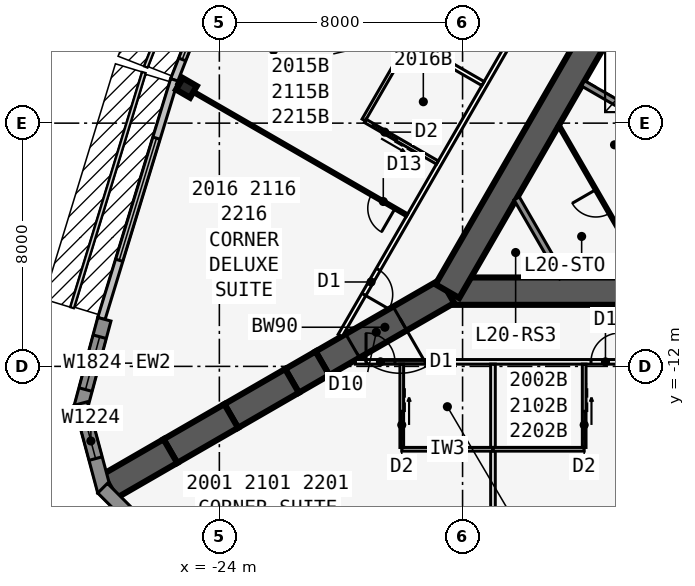
"""IFC4 building model, lengths in metres.
Left out: names, types, materials, properties, quantities, classifications, styles, units other than length and angle.
Written with IfcOpenShell. Run it as: python <this file> out.ifc"""

import sys

from ifc_helpers import new_model, si_unit, direction, frame, frame_2d, origin, origin_2d, place, context, subcontext, project, spatial, polyline, rectangle, i_section, outline, extrude, element, fill, save


model = new_model("IFC4")
c1 = context("Model", 3, precision=1e-05, world=origin(), true_north=direction((0.0, 1.0)))
c2 = subcontext(c1, "Body", "Model", "MODEL_VIEW")
j1 = project(units=[si_unit("LENGTHUNIT", "METRE"), si_unit("PLANEANGLEUNIT", "RADIAN")], contexts=[c1])
p1 = place(None, origin())
s1 = spatial("IfcSite", under=j1, at=p1, CompositionType="ELEMENT")
p2 = place(p1, origin())
s2 = spatial("IfcBuilding", under=s1, at=p2, CompositionType="ELEMENT")
p3 = place(p2, frame((0.0, 0.0, 79.5)))
s3 = spatial("IfcBuildingStorey", under=s2, at=p3, CompositionType="ELEMENT", Elevation=79.5)
p4 = place(p3, frame((-16.5, -9.526, 0.0), z_axis=(0.0, 0.0, 1.0), x_axis=(1.0, 0.0, 0.0)))
e1 = element("IfcWall", 1, at=p4, inside=s3, PredefinedType="SHEAR", context=c2, shape_type="SweptSolid", body=[
    extrude(rectangle(XDim=33.0, YDim=0.9, at=frame_2d((16.5, 0.0))), origin(), (0.0, 0.0, 1.0), 3.4),
])
p5 = place(p4, frame((14.05, 0.0, 0.0)))
e2 = element("IfcOpeningElement", 2, at=p5, cuts=e1, PredefinedType="OPENING", context=c2, shape_type="SweptSolid", body=[
    extrude(rectangle(XDim=1.8, YDim=2.13, at=frame_2d((0.9, 1.065))), frame((0.0, 0.46, 0.0), z_axis=(0.0, -1.0, 0.0), x_axis=(1.0, 0.0, 0.0)), (0.0, 0.0, 1.0), 0.92),
])
p6 = place(p3, frame((0.0, 19.052, 0.0), z_axis=(0.0, 0.0, 1.0), x_axis=(-0.499999749417, -0.866025548458, 0.0)))
e3 = element("IfcWall", 3, at=p6, inside=s3, PredefinedType="SHEAR", context=c2, shape_type="SweptSolid", body=[
    extrude(rectangle(XDim=33.0, YDim=0.9, at=frame_2d((16.5, 0.0))), origin(), (0.0, 0.0, 1.0), 3.4),
])
p7 = place(p6, frame((14.15, 0.0, 0.0)))
e4 = element("IfcOpeningElement", 4, at=p7, cuts=e3, PredefinedType="OPENING", context=c2, shape_type="SweptSolid", body=[
    extrude(rectangle(XDim=1.8, YDim=2.13, at=frame_2d((0.9, 1.065))), frame((0.0, 0.46, 0.0), z_axis=(0.0, -1.0, 0.0), x_axis=(1.0, 0.0, 0.0)), (0.0, 0.0, 1.0), 0.92),
])
p8 = place(p6, frame((12.6, 0.0, 0.0)))
e5 = element("IfcOpeningElement", 5, at=p8, cuts=e3, PredefinedType="OPENING", context=c2, shape_type="SweptSolid", body=[
    extrude(rectangle(XDim=1.0, YDim=2.13, at=frame_2d((0.5, 1.065))), frame((0.0, 0.46, 0.0), z_axis=(0.0, -1.0, 0.0), x_axis=(1.0, 0.0, 0.0)), (0.0, 0.0, 1.0), 0.92),
])
p9 = place(p3, frame((-9.329, -4.256, 0.0), z_axis=(0.0, 0.0, 1.0), x_axis=(-0.866022959057, 0.500004234368, 0.0)))
e6 = element("IfcWall", 6, at=p9, inside=s3, PredefinedType="SOLIDWALL", context=c2, shape_type="SweptSolid", body=[
    extrude(rectangle(XDim=3.125, YDim=0.2, at=frame_2d((1.562, 0.0))), origin(), (0.0, 0.0, 1.0), 3.235),
])
p10 = place(p3, frame((-16.5, -9.526, 0.0), z_axis=(0.0, 0.0, 1.0), x_axis=(-0.866031398331, -0.499989616998, 0.0)))
e7 = element("IfcWall", 7, at=p10, inside=s3, PredefinedType="SHEAR", context=c2, shape_type="SweptSolid", body=[
    extrude(rectangle(XDim=4.746, YDim=0.9, at=frame_2d((2.373, 0.0))), origin(), (0.0, 0.0, 1.0), 3.4),
])
p11 = place(p10, frame((1.8, 0.0, 0.0)))
e8 = element("IfcOpeningElement", 8, at=p11, cuts=e7, PredefinedType="OPENING", context=c2, shape_type="SweptSolid", body=[
    extrude(rectangle(XDim=1.8, YDim=2.13, at=frame_2d((0.9, 1.065))), frame((0.0, 0.46, 0.0), z_axis=(0.0, -1.0, 0.0), x_axis=(1.0, 0.0, 0.0)), (0.0, 0.0, 1.0), 0.92),
])
p12 = place(p3, frame((-20.61, -11.899, 0.0), z_axis=(0.0, 0.0, 1.0), x_axis=(-0.866009537788, -0.500027479704, 0.0)))
e9 = element("IfcWall", 9, at=p12, inside=s3, PredefinedType="SHEAR", context=c2, shape_type="SweptSolid", body=[
    extrude(rectangle(XDim=1.155, YDim=0.9, at=frame_2d((0.577, 0.0))), origin(), (0.0, 0.0, 1.0), 3.4),
])
for number, where, z_axis, x_axis in (
    (10, (-21.61, -12.477, 0.0), (0.0, 0.0, 1.0), (-0.866, -0.5, 0.0)),
    (11, (-23.61, -13.631, 0.0), (0.0, 0.0, 1.0), (-0.866, -0.5, 0.0)),
    (12, (-25.61, -14.786, 0.0), (0.0, 0.0, 1.0), (-0.866, -0.5, 0.0)),
):
    element("IfcWall", number, at=place(p3, frame(where, z_axis=z_axis, x_axis=x_axis)), inside=s3, PredefinedType="SHEAR", context=c2, shape_type="SweptSolid", body=[
        extrude(rectangle(XDim=2.309, YDim=0.9, at=frame_2d((1.155, 0.0))), origin(), (0.0, 0.0, 1.0), 3.4),
    ])
p13 = place(p3, frame((-25.083, -2.839, 0.0), z_axis=(0.0, 0.0, 1.0), x_axis=(-0.5, -0.866025403784, 0.0)))
e13 = element("IfcColumn", 13, at=p13, inside=s3, PredefinedType="COLUMN", context=c2, shape_type="SweptSolid", body=[
    extrude(i_section(OverallWidth=0.442, OverallDepth=0.531, WebThickness=0.066, FlangeThickness=0.106, at=origin_2d()), origin(), (0.0, 0.0, 1.0), 3.4),
])
p14 = place(p3, frame((-23.645, 2.126, 0.0), z_axis=(0.0, 0.0, 1.0), x_axis=(-0.364013463868, -0.931393685894, 0.0)))
e14 = element("IfcWall", 14, at=p14, inside=s3, PredefinedType="STANDARD", context=c2, shape_type="SweptSolid", body=[
    extrude(rectangle(XDim=5.058, YDim=0.25, at=frame_2d((2.529, 0.0))), origin(), (0.0, 0.0, 1.0), 3.235),
])
p15 = place(p14, frame((0.729, 0.0, 0.45)))
e15 = element("IfcOpeningElement", 15, at=p15, cuts=e14, PredefinedType="OPENING", context=c2, shape_type="SweptSolid", body=[
    extrude(rectangle(XDim=3.6, YDim=2.4, at=frame_2d((1.8, 1.2))), frame((0.0, 0.135, 0.0), z_axis=(0.0, -1.0, 0.0), x_axis=(1.0, 0.0, 0.0)), (0.0, 0.0, 1.0), 0.27),
])
p16 = place(p3, frame((-25.483, -2.575, 0.0), z_axis=(0.0, 0.0, 1.0), x_axis=(-0.2919790669, -0.956424709265, 0.0)))
e16 = element("IfcWall", 16, at=p16, inside=s3, PredefinedType="STANDARD", context=c2, shape_type="SweptSolid", body=[
    extrude(rectangle(XDim=8.211, YDim=0.25, at=frame_2d((4.105, 0.0))), origin(), (0.0, 0.0, 1.0), 3.235),
])
p17 = place(p16, frame((2.006, 0.0, 0.45)))
e17 = element("IfcOpeningElement", 17, at=p17, cuts=e16, PredefinedType="OPENING", context=c2, shape_type="SweptSolid", body=[
    extrude(rectangle(XDim=4.2, YDim=2.4, at=frame_2d((2.1, 1.2))), frame((0.0, 0.135, 0.0), z_axis=(0.0, -1.0, 0.0), x_axis=(1.0, 0.0, 0.0)), (0.0, 0.0, 1.0), 0.27),
])
p18 = place(p3, frame((-27.783, -10.45, 0.0), z_axis=(0.0, 0.0, 1.0), x_axis=(-0.258780998834, -0.965936019953, 0.0)))
e18 = element("IfcWall", 18, at=p18, inside=s3, PredefinedType="SOLIDWALL", context=c2, shape_type="SweptSolid", body=[
    extrude(rectangle(XDim=2.989, YDim=0.45, at=frame_2d((1.494, 0.0))), origin(), (0.0, 0.0, 1.0), 3.235),
])
p19 = place(p18, frame((0.594, 0.0, 0.45)))
e19 = element("IfcOpeningElement", 19, at=p19, cuts=e18, PredefinedType="OPENING", context=c2, shape_type="SweptSolid", body=[
    extrude(rectangle(XDim=1.8, YDim=2.4, at=frame_2d((0.9, 1.2))), frame((0.0, 0.235, 0.0), z_axis=(0.0, -1.0, 0.0), x_axis=(1.0, 0.0, 0.0)), (0.0, 0.0, 1.0), 0.47),
])
p20 = place(p3, frame((-28.556, -13.221, 0.0), z_axis=(0.0, 0.0, 1.0), x_axis=(0.258801419081, -0.965930548995, 0.0)))
e20 = element("IfcWall", 20, at=p20, inside=s3, PredefinedType="SOLIDWALL", context=c2, shape_type="SweptSolid", body=[
    extrude(outline(polyline([(2.989, 0.225), (2.929, 0.225), (2.437, 0.093), (2.402, 0.225), (0.0, 0.225), (0.0, -0.225), (2.989, -0.225), (2.989, 0.225)])), origin(), (0.0, 0.0, 1.0), 3.235),
])
p21 = place(p20, frame((0.676, 0.0, 0.45)))
e21 = element("IfcOpeningElement", 21, at=p21, cuts=e20, PredefinedType="OPENING", context=c2, shape_type="SweptSolid", body=[
    extrude(rectangle(XDim=1.2, YDim=2.4, at=frame_2d((0.6, 1.2))), frame((0.0, 0.235, 0.0), z_axis=(0.0, -1.0, 0.0), x_axis=(1.0, 0.0, 0.0)), (0.0, 0.0, 1.0), 0.47),
])
p22 = place(p3, frame((-27.841, -16.007, 0.0), z_axis=(0.0, 0.0, 1.0), x_axis=(0.707025086683, -0.707188466253, 0.0)))
e22 = element("IfcWall", 22, at=p22, inside=s3, PredefinedType="SOLIDWALL", context=c2, shape_type="SweptSolid", body=[
    extrude(outline(polyline([(2.989, 0.225), (0.586, 0.225), (0.551, 0.093), (0.059, 0.225), (0.0, 0.225), (0.0, -0.225), (2.989, -0.225), (2.989, 0.225)])), origin(), (0.0, 0.0, 1.0), 3.235),
])
p23 = place(p22, frame((1.113, 0.0, 0.45)))
e23 = element("IfcOpeningElement", 23, at=p23, cuts=e22, PredefinedType="OPENING", context=c2, shape_type="SweptSolid", body=[
    extrude(rectangle(XDim=1.2, YDim=2.4, at=frame_2d((0.6, 1.2))), frame((0.0, 0.235, 0.0), z_axis=(0.0, -1.0, 0.0), x_axis=(1.0, 0.0, 0.0)), (0.0, 0.0, 1.0), 0.47),
])
p24 = place(p3, frame((-19.527, -11.851, 0.0), z_axis=(0.0, 0.0, 1.0), x_axis=(1.0, 0.0, 0.0)))
e24 = element("IfcWall", 24, at=p24, inside=s3, PredefinedType="PARTITIONING", context=c2, shape_type="SweptSolid", body=[
    extrude(rectangle(XDim=39.054, YDim=0.15, at=frame_2d((19.527, 0.0))), origin(), (0.0, 0.0, 1.0), 3.235),
])
p25 = place(p24, frame((0.352, 0.0, 0.0)))
e25 = element("IfcOpeningElement", 25, at=p25, cuts=e24, PredefinedType="OPENING", context=c2, shape_type="SweptSolid", body=[
    extrude(rectangle(XDim=0.95, YDim=2.13, at=frame_2d((0.475, 1.065))), frame((0.0, 0.085, 0.0), z_axis=(0.0, -1.0, 0.0), x_axis=(1.0, 0.0, 0.0)), (0.0, 0.0, 1.0), 0.17),
])
p26 = place(p24, frame((7.752, 0.0, 0.0)))
e26 = element("IfcOpeningElement", 26, at=p26, cuts=e24, PredefinedType="OPENING", context=c2, shape_type="SweptSolid", body=[
    extrude(rectangle(XDim=0.95, YDim=2.13, at=frame_2d((0.475, 1.065))), frame((0.0, 0.085, 0.0), z_axis=(0.0, -1.0, 0.0), x_axis=(1.0, 0.0, 0.0)), (0.0, 0.0, 1.0), 0.17),
])
p27 = place(p24, frame((17.752, 0.0, 0.0)))
e27 = element("IfcOpeningElement", 27, at=p27, cuts=e24, PredefinedType="OPENING", context=c2, shape_type="SweptSolid", body=[
    extrude(rectangle(XDim=0.95, YDim=2.13, at=frame_2d((0.475, 1.065))), frame((0.0, 0.085, 0.0), z_axis=(0.0, -1.0, 0.0), x_axis=(1.0, 0.0, 0.0)), (0.0, 0.0, 1.0), 0.17),
])
p28 = place(p24, frame((21.527, 0.0, 0.0)))
e28 = element("IfcOpeningElement", 28, at=p28, cuts=e24, PredefinedType="OPENING", context=c2, shape_type="SweptSolid", body=[
    extrude(rectangle(XDim=1.0, YDim=2.13, at=frame_2d((0.5, 1.065))), frame((0.0, 0.085, 0.0), z_axis=(0.0, -1.0, 0.0), x_axis=(1.0, 0.0, 0.0)), (0.0, 0.0, 1.0), 0.17),
])
p29 = place(p24, frame((27.152, 0.0, 0.0)))
e29 = element("IfcOpeningElement", 29, at=p29, cuts=e24, PredefinedType="OPENING", context=c2, shape_type="SweptSolid", body=[
    extrude(rectangle(XDim=0.95, YDim=2.13, at=frame_2d((0.475, 1.065))), frame((0.0, 0.085, 0.0), z_axis=(0.0, -1.0, 0.0), x_axis=(1.0, 0.0, 0.0)), (0.0, 0.0, 1.0), 0.17),
])
p30 = place(p24, frame((32.152, 0.0, 0.0)))
e30 = element("IfcOpeningElement", 30, at=p30, cuts=e24, PredefinedType="OPENING", context=c2, shape_type="SweptSolid", body=[
    extrude(rectangle(XDim=0.95, YDim=2.13, at=frame_2d((0.475, 1.065))), frame((0.0, 0.085, 0.0), z_axis=(0.0, -1.0, 0.0), x_axis=(1.0, 0.0, 0.0)), (0.0, 0.0, 1.0), 0.17),
])
p31 = place(p24, frame((37.752, 0.0, 0.0)))
e31 = element("IfcOpeningElement", 31, at=p31, cuts=e24, PredefinedType="OPENING", context=c2, shape_type="SweptSolid", body=[
    extrude(rectangle(XDim=0.95, YDim=2.13, at=frame_2d((0.475, 1.065))), frame((0.0, 0.085, 0.0), z_axis=(0.0, -1.0, 0.0), x_axis=(1.0, 0.0, 0.0)), (0.0, 0.0, 1.0), 0.17),
])
p32 = place(p3, frame((-15.0, -11.926, 0.0), z_axis=(0.0, 0.0, 1.0), x_axis=(0.0, -1.0, 0.0)))
e32 = element("IfcWall", 32, at=p32, inside=s3, PredefinedType="PARTITIONING", context=c2, shape_type="SweptSolid", body=[
    extrude(rectangle(XDim=8.72, YDim=0.15, at=frame_2d((4.36, 0.0))), origin(), (0.0, 0.0, 1.0), 2.389),
])
p33 = place(p3, frame((-18.0, -14.726, 0.0), z_axis=(0.0, 0.0, 1.0), x_axis=(1.0, 0.0, 0.0)))
e33 = element("IfcWall", 33, at=p33, inside=s3, PredefinedType="PLUMBINGWALL", context=c2, shape_type="SweptSolid", body=[
    extrude(rectangle(XDim=3.0, YDim=0.12, at=frame_2d((1.5, 0.0))), origin(), (0.0, 0.0, 1.0), 3.235),
])
p34 = place(p3, frame((-18.0, -11.926, 0.0), z_axis=(0.0, 0.0, 1.0), x_axis=(0.0, -1.0, 0.0)))
e34 = element("IfcWall", 34, at=p34, inside=s3, PredefinedType="PLUMBINGWALL", context=c2, shape_type="SweptSolid", body=[
    extrude(rectangle(XDim=2.74, YDim=0.12, at=frame_2d((1.37, 0.0))), origin(), (0.0, 0.0, 1.0), 3.235),
])
p35 = place(p34, frame((1.55, 0.0, 0.0)))
e35 = element("IfcOpeningElement", 35, at=p35, cuts=e34, PredefinedType="OPENING", context=c2, shape_type="SweptSolid", body=[
    extrude(rectangle(XDim=0.9, YDim=2.13, at=frame_2d((0.45, 1.065))), frame((0.0, 0.07, 0.0), z_axis=(0.0, -1.0, 0.0), x_axis=(1.0, 0.0, 0.0)), (0.0, 0.0, 1.0), 0.14),
])
p36 = place(p3, frame((-15.0, -14.726, 0.0), z_axis=(0.0, 0.0, 1.0), x_axis=(1.0, 0.0, 0.0)))
e36 = element("IfcWall", 36, at=p36, inside=s3, PredefinedType="PLUMBINGWALL", context=c2, shape_type="SweptSolid", body=[
    extrude(rectangle(XDim=3.0, YDim=0.12, at=frame_2d((1.5, 0.0))), origin(), (0.0, 0.0, 1.0), 3.235),
])
p37 = place(p3, frame((-12.0, -11.926, 0.0), z_axis=(0.0, 0.0, 1.0), x_axis=(0.0, -1.0, 0.0)))
e37 = element("IfcWall", 37, at=p37, inside=s3, PredefinedType="PLUMBINGWALL", context=c2, shape_type="SweptSolid", body=[
    extrude(rectangle(XDim=2.74, YDim=0.12, at=frame_2d((1.37, 0.0))), origin(), (0.0, 0.0, 1.0), 3.235),
])
p38 = place(p37, frame((1.55, 0.0, 0.0)))
e38 = element("IfcOpeningElement", 38, at=p38, cuts=e37, PredefinedType="OPENING", context=c2, shape_type="SweptSolid", body=[
    extrude(rectangle(XDim=0.9, YDim=2.13, at=frame_2d((0.45, 1.065))), frame((0.0, 0.07, 0.0), z_axis=(0.0, -1.0, 0.0), x_axis=(1.0, 0.0, 0.0)), (0.0, 0.0, 1.0), 0.14),
])
p39 = place(p3, frame((-0.5, 22.836, 0.0), z_axis=(0.0, 0.0, 1.0), x_axis=(-0.500001677587, -0.866024435227, 0.0)))
e39 = element("IfcWall", 39, at=p39, inside=s3, PredefinedType="PARTITIONING", context=c2, shape_type="SweptSolid", body=[
    extrude(rectangle(XDim=39.054, YDim=0.15, at=frame_2d((19.527, 0.0))), origin(), (0.0, 0.0, 1.0), 3.235),
])
p40 = place(p39, frame((0.352, 0.0, 0.0)))
e40 = element("IfcOpeningElement", 40, at=p40, cuts=e39, PredefinedType="OPENING", context=c2, shape_type="SweptSolid", body=[
    extrude(rectangle(XDim=0.95, YDim=2.13, at=frame_2d((0.475, 1.065))), frame((0.0, 0.085, 0.0), z_axis=(0.0, -1.0, 0.0), x_axis=(1.0, 0.0, 0.0)), (0.0, 0.0, 1.0), 0.17),
])
p41 = place(p39, frame((11.552, 0.0, 0.0)))
e41 = element("IfcOpeningElement", 41, at=p41, cuts=e39, PredefinedType="OPENING", context=c2, shape_type="SweptSolid", body=[
    extrude(rectangle(XDim=0.95, YDim=2.13, at=frame_2d((0.475, 1.065))), frame((0.0, 0.085, 0.0), z_axis=(0.0, -1.0, 0.0), x_axis=(1.0, 0.0, 0.0)), (0.0, 0.0, 1.0), 0.17),
])
p42 = place(p39, frame((21.552, 0.0, 0.0)))
e42 = element("IfcOpeningElement", 42, at=p42, cuts=e39, PredefinedType="OPENING", context=c2, shape_type="SweptSolid", body=[
    extrude(rectangle(XDim=0.95, YDim=2.13, at=frame_2d((0.475, 1.065))), frame((0.0, 0.085, 0.0), z_axis=(0.0, -1.0, 0.0), x_axis=(1.0, 0.0, 0.0)), (0.0, 0.0, 1.0), 0.17),
])
p43 = place(p39, frame((36.546, 0.0, 0.0)))
e43 = element("IfcOpeningElement", 43, at=p43, cuts=e39, PredefinedType="OPENING", context=c2, shape_type="SweptSolid", body=[
    extrude(rectangle(XDim=0.95, YDim=2.13, at=frame_2d((0.475, 1.065))), frame((0.0, 0.085, 0.0), z_axis=(0.0, -1.0, 0.0), x_axis=(1.0, 0.0, 0.0)), (0.0, 0.0, 1.0), 0.17),
])
p44 = place(p3, frame((-15.329, -2.697, 0.0), z_axis=(0.0, 0.0, 1.0), x_axis=(-0.866018409083, 0.500012114982, 0.0)))
e44 = element("IfcWall", 44, at=p44, inside=s3, PredefinedType="PARTITIONING", context=c2, shape_type="SweptSolid", body=[
    extrude(rectangle(XDim=9.485, YDim=0.15, at=frame_2d((4.742, 0.0))), origin(), (0.0, 0.0, 1.0), 2.389),
])
p45 = place(p3, frame((-17.829, -7.027, 0.0), z_axis=(0.0, 0.0, 1.0), x_axis=(-0.866032659912, 0.499987431809, 0.0)))
e45 = element("IfcWall", 45, at=p45, inside=s3, PredefinedType="PARTITIONING", context=c2, shape_type="SweptSolid", body=[
    extrude(rectangle(XDim=8.72, YDim=0.1, at=frame_2d((4.36, 0.0))), origin(), (0.0, 0.0, 1.0), 2.389),
])
p46 = place(p45, frame((0.45, 0.0, 0.0)))
e46 = element("IfcOpeningElement", 46, at=p46, cuts=e45, PredefinedType="OPENING", context=c2, shape_type="SweptSolid", body=[
    extrude(rectangle(XDim=0.9, YDim=2.13, at=frame_2d((0.45, 1.065))), frame((0.0, 0.06, 0.0), z_axis=(0.0, -1.0, 0.0), x_axis=(1.0, 0.0, 0.0)), (0.0, 0.0, 1.0), 0.12),
])
p47 = place(p3, frame((-17.753, -1.297, 0.0), z_axis=(0.0, 0.0, 1.0), x_axis=(-0.499990139034, -0.866031096941, 0.0)))
e47 = element("IfcWall", 47, at=p47, inside=s3, PredefinedType="PLUMBINGWALL", context=c2, shape_type="SweptSolid", body=[
    extrude(rectangle(XDim=3.0, YDim=0.12, at=frame_2d((1.5, 0.0))), origin(), (0.0, 0.0, 1.0), 3.235),
])
p48 = place(p3, frame((-16.829, -5.295, 0.0), z_axis=(0.0, 0.0, 1.0), x_axis=(-0.866035715982, 0.499982138324, 0.0)))
e48 = element("IfcWall", 48, at=p48, inside=s3, PredefinedType="PLUMBINGWALL", context=c2, shape_type="SweptSolid", body=[
    extrude(rectangle(XDim=2.74, YDim=0.12, at=frame_2d((1.37, 0.0))), origin(), (0.0, 0.0, 1.0), 3.235),
])
p49 = place(p48, frame((1.55, 0.0, 0.0)))
e49 = element("IfcOpeningElement", 49, at=p49, cuts=e48, PredefinedType="OPENING", context=c2, shape_type="SweptSolid", body=[
    extrude(rectangle(XDim=0.9, YDim=2.13, at=frame_2d((0.45, 1.065))), frame((0.0, 0.07, 0.0), z_axis=(0.0, -1.0, 0.0), x_axis=(1.0, 0.0, 0.0)), (0.0, 0.0, 1.0), 0.14),
])
p50 = place(p3, frame((-12.719, -9.076, 0.0), z_axis=(0.0, 0.0, 1.0), x_axis=(-0.499952404951, 0.866052881055, 0.0)))
e50 = element("IfcWall", 50, at=p50, inside=s3, PredefinedType="SOLIDWALL", context=c2, shape_type="SweptSolid", body=[
    extrude(rectangle(XDim=3.002, YDim=0.2, at=frame_2d((1.501, 0.0))), origin(), (0.0, 0.0, 1.0), 3.235),
])
p51 = place(p3, frame((-9.947, -9.076, 0.0), z_axis=(0.0, 0.0, 1.0), x_axis=(-0.500027479704, 0.866009537788, 0.0)))
e51 = element("IfcWall", 51, at=p51, inside=s3, PredefinedType="PARTITIONING", context=c2, shape_type="SweptSolid", body=[
    extrude(rectangle(XDim=5.774, YDim=0.1, at=frame_2d((2.887, 0.0))), origin(), (0.0, 0.0, 1.0), 3.235),
])
p52 = place(p51, frame((2.437, 0.0, 0.0)))
e52 = element("IfcOpeningElement", 52, at=p52, cuts=e51, PredefinedType="OPENING", context=c2, shape_type="SweptSolid", body=[
    extrude(rectangle(XDim=0.9, YDim=2.13, at=frame_2d((0.45, 1.065))), frame((0.0, 0.06, 0.0), z_axis=(0.0, -1.0, 0.0), x_axis=(1.0, 0.0, 0.0)), (0.0, 0.0, 1.0), 0.12),
])
p53 = place(p15, origin())
e53 = element("IfcWindow", 53, at=p53, inside=s3, PartitioningType="SINGLE_PANEL", PredefinedType="WINDOW", context=c2, shape_type="SweptSolid", body=[
    extrude(rectangle(XDim=3.6, YDim=2.4, at=frame_2d((1.8, 1.2))), frame((0.0, 0.03, 0.0), z_axis=(0.0, -1.0, 0.0), x_axis=(1.0, 0.0, 0.0)), (0.0, 0.0, 1.0), 0.06),
])
fill(e15, e53)
p54 = place(p17, origin())
e54 = element("IfcWindow", 54, at=p54, inside=s3, PartitioningType="SINGLE_PANEL", PredefinedType="WINDOW", context=c2, shape_type="SweptSolid", body=[
    extrude(rectangle(XDim=4.2, YDim=2.4, at=frame_2d((2.1, 1.2))), frame((0.0, 0.03, 0.0), z_axis=(0.0, -1.0, 0.0), x_axis=(1.0, 0.0, 0.0)), (0.0, 0.0, 1.0), 0.06),
])
fill(e17, e54)
p55 = place(p19, origin())
e55 = element("IfcWindow", 55, at=p55, inside=s3, PartitioningType="SINGLE_PANEL", PredefinedType="WINDOW", context=c2, shape_type="SweptSolid", body=[
    extrude(rectangle(XDim=1.8, YDim=2.4, at=frame_2d((0.9, 1.2))), frame((0.0, 0.03, 0.0), z_axis=(0.0, -1.0, 0.0), x_axis=(1.0, 0.0, 0.0)), (0.0, 0.0, 1.0), 0.06),
])
fill(e19, e55)
p56 = place(p21, origin())
e56 = element("IfcWindow", 56, at=p56, inside=s3, PartitioningType="SINGLE_PANEL", PredefinedType="WINDOW", context=c2, shape_type="SweptSolid", body=[
    extrude(rectangle(XDim=1.2, YDim=2.4, at=frame_2d((0.6, 1.2))), frame((0.0, 0.03, 0.0), z_axis=(0.0, -1.0, 0.0), x_axis=(1.0, 0.0, 0.0)), (0.0, 0.0, 1.0), 0.06),
])
fill(e21, e56)
p57 = place(p35, origin())
e57 = element("IfcDoor", 57, at=p57, inside=s3, OperationType="SLIDING_TO_LEFT", PredefinedType="DOOR", context=c2, shape_type="SweptSolid", body=[
    extrude(rectangle(XDim=0.9, YDim=2.13, at=frame_2d((0.45, 1.065))), frame((0.0, 0.025, 0.0), z_axis=(0.0, -1.0, 0.0), x_axis=(1.0, 0.0, 0.0)), (0.0, 0.0, 1.0), 0.05),
])
fill(e35, e57)
p58 = place(p25, origin())
e58 = element("IfcDoor", 58, at=p58, inside=s3, OperationType="SINGLE_SWING_LEFT", PredefinedType="DOOR", context=c2, shape_type="SweptSolid", body=[
    extrude(rectangle(XDim=0.95, YDim=2.13, at=frame_2d((0.475, 1.065))), frame((0.0, 0.025, 0.0), z_axis=(0.0, -1.0, 0.0), x_axis=(1.0, 0.0, 0.0)), (0.0, 0.0, 1.0), 0.05),
])
fill(e25, e58)
p59 = place(p38, origin())
e59 = element("IfcDoor", 59, at=p59, inside=s3, OperationType="SLIDING_TO_LEFT", PredefinedType="DOOR", context=c2, shape_type="SweptSolid", body=[
    extrude(rectangle(XDim=0.9, YDim=2.13, at=frame_2d((0.45, 1.065))), frame((0.0, 0.025, 0.0), z_axis=(0.0, -1.0, 0.0), x_axis=(1.0, 0.0, 0.0)), (0.0, 0.0, 1.0), 0.05),
])
fill(e38, e59)
p60 = place(p26, origin())
e60 = element("IfcDoor", 60, at=p60, inside=s3, OperationType="SINGLE_SWING_RIGHT", PredefinedType="DOOR", context=c2, shape_type="SweptSolid", body=[
    extrude(rectangle(XDim=0.95, YDim=2.13, at=frame_2d((0.475, 1.065))), frame((0.0, 0.025, 0.0), z_axis=(0.0, -1.0, 0.0), x_axis=(1.0, 0.0, 0.0)), (0.0, 0.0, 1.0), 0.05),
])
fill(e26, e60)
p61 = place(p46, origin())
e61 = element("IfcDoor", 61, at=p61, inside=s3, OperationType="SINGLE_SWING_LEFT", PredefinedType="DOOR", context=c2, shape_type="SweptSolid", body=[
    extrude(rectangle(XDim=0.9, YDim=2.13, at=frame_2d((0.45, 1.065))), frame((0.0, 0.025, 0.0), z_axis=(0.0, -1.0, 0.0), x_axis=(1.0, 0.0, 0.0)), (0.0, 0.0, 1.0), 0.05),
])
fill(e46, e61)
p62 = place(p49, origin())
e62 = element("IfcDoor", 62, at=p62, inside=s3, OperationType="SLIDING_TO_LEFT", PredefinedType="DOOR", context=c2, shape_type="SweptSolid", body=[
    extrude(rectangle(XDim=0.9, YDim=2.13, at=frame_2d((0.45, 1.065))), frame((0.0, 0.025, 0.0), z_axis=(0.0, -1.0, 0.0), x_axis=(1.0, 0.0, 0.0)), (0.0, 0.0, 1.0), 0.05),
])
fill(e49, e62)
p63 = place(p43, origin())
e63 = element("IfcDoor", 63, at=p63, inside=s3, OperationType="SINGLE_SWING_RIGHT", PredefinedType="DOOR", context=c2, shape_type="SweptSolid", body=[
    extrude(rectangle(XDim=0.95, YDim=2.13, at=frame_2d((0.475, 1.065))), frame((0.0, 0.025, 0.0), z_axis=(0.0, -1.0, 0.0), x_axis=(1.0, 0.0, 0.0)), (0.0, 0.0, 1.0), 0.05),
])
fill(e43, e63)
p64 = place(p11, origin())
e64 = element("IfcDoor", 64, at=p64, inside=s3, OperationType="DOUBLE_DOOR_DOUBLE_SWING", PredefinedType="DOOR", context=c2, shape_type="SweptSolid", body=[
    extrude(rectangle(XDim=1.8, YDim=2.13, at=frame_2d((0.9, 1.065))), frame((0.0, 0.025, 0.0), z_axis=(0.0, -1.0, 0.0), x_axis=(1.0, 0.0, 0.0)), (0.0, 0.0, 1.0), 0.05),
])
fill(e8, e64)
p65 = place(p52, origin())
e65 = element("IfcDoor", 65, at=p65, inside=s3, OperationType="SINGLE_SWING_RIGHT", PredefinedType="DOOR", context=c2, shape_type="SweptSolid", body=[
    extrude(rectangle(XDim=0.9, YDim=2.13, at=frame_2d((0.45, 1.065))), frame((0.0, 0.025, 0.0), z_axis=(0.0, -1.0, 0.0), x_axis=(1.0, 0.0, 0.0)), (0.0, 0.0, 1.0), 0.05),
])
fill(e52, e65)
save(model, sys.argv[1])
